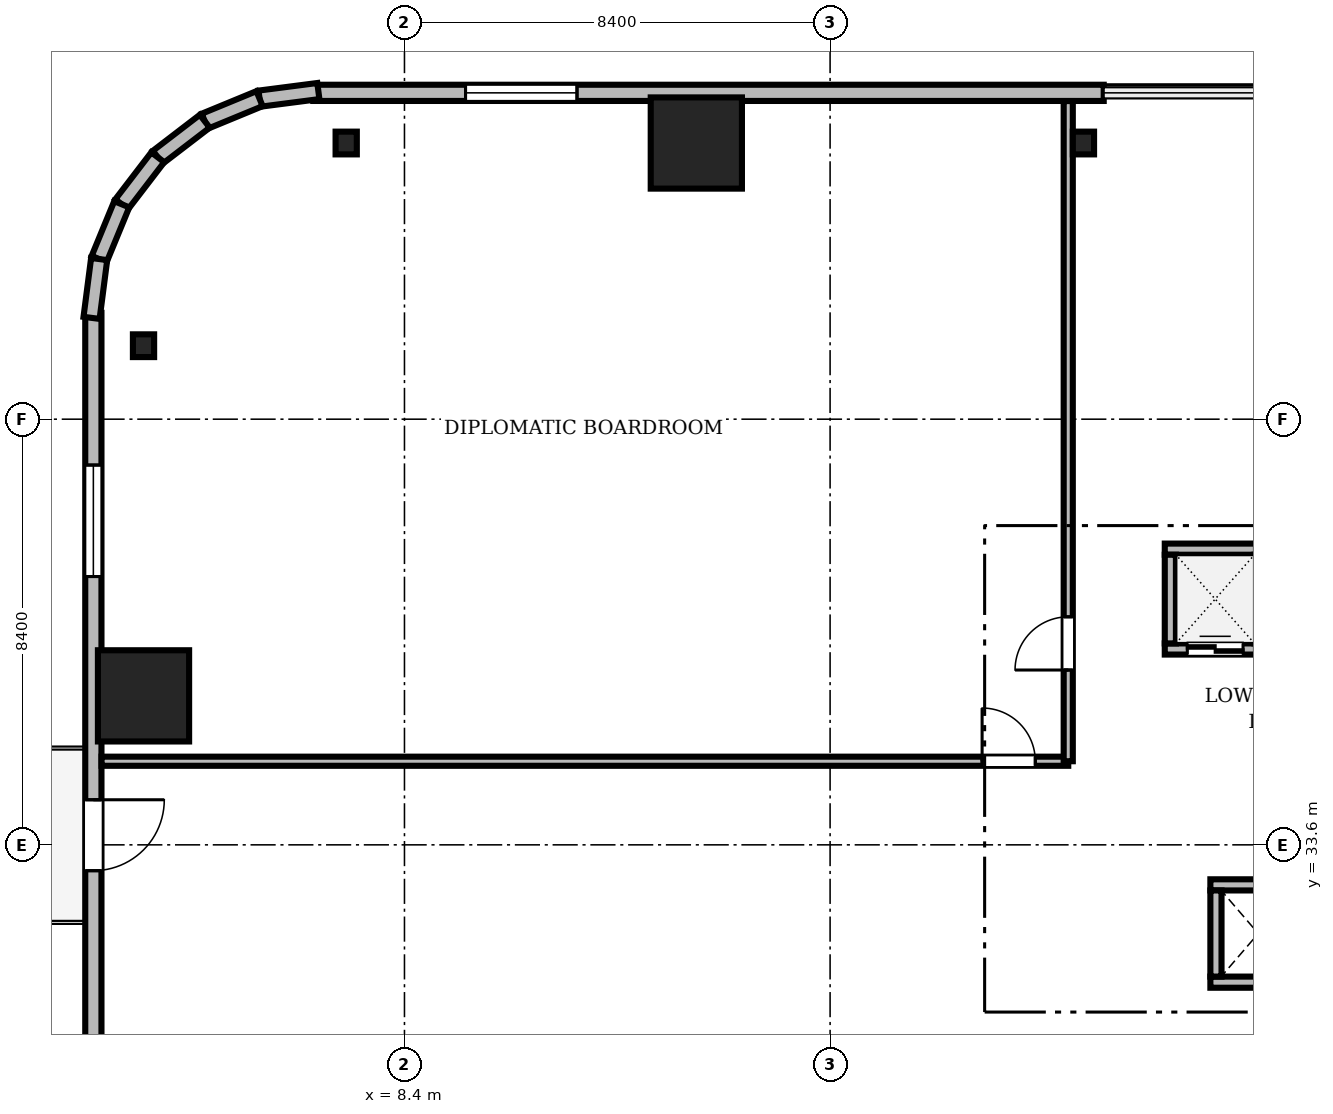
"""IFC4 building model, lengths in metres.
Left out: names, types, materials, properties, quantities, classifications, styles, units other than length and angle.
Written with IfcOpenShell. Run it as: python <this file> out.ifc"""

import sys

from ifc_helpers import new_model, si_unit, direction, frame, frame_2d, origin, origin_2d, place, context, subcontext, project, spatial, rectangle, i_section, extrude, source, transform, mapped, element, fill, save


model = new_model("IFC4")
c1 = context("Model", 3, precision=1e-05, world=origin(), true_north=direction((0.0, 1.0)))
c2 = subcontext(c1, "Body", "Model", "MODEL_VIEW")
j1 = project(units=[si_unit("LENGTHUNIT", "METRE"), si_unit("PLANEANGLEUNIT", "RADIAN")], contexts=[c1])
p1 = place(None, origin())
s1 = spatial("IfcSite", under=j1, at=p1, CompositionType="ELEMENT")
p2 = place(p1, origin())
s2 = spatial("IfcBuilding", under=s1, at=p2, CompositionType="ELEMENT")
p3 = place(p2, frame((0.0, 0.0, 31.25)))
s3 = spatial("IfcBuildingStorey", under=s2, at=p3, CompositionType="ELEMENT", Elevation=31.25)
m1 = source(origin(), c2, "Body", "SweptSolid", [
    extrude(rectangle(XDim=1.8, YDim=1.8, at=origin_2d()), origin(), (0.0, 0.0, 1.0), 3.41),
])
for number, where, z_axis, x_axis in (
    (1, (14.16, 47.45, 0.0), (0.0, 0.0, 1.0), (1.0, 0.0, 0.0)),
    (2, (3.25, 36.54, 0.0), (0.0, 0.0, 1.0), (1.0, 0.0, 0.0)),
):
    element("IfcColumn", number, at=place(p3, frame(where, z_axis=z_axis, x_axis=x_axis)), inside=s3, PredefinedType="COLUMN", context=c2, shape_type="MappedRepresentation", body=[
        mapped(m1, transform((0.0, 0.0, 0.0), scale=1.0)),
    ])
m2 = source(origin(), c2, "Body", "SweptSolid", [
    extrude(i_section(OverallWidth=0.419, OverallDepth=0.449, WebThickness=0.031, FlangeThickness=0.048, FilletRadius=0.015, at=origin_2d()), origin(), (0.0, 0.0, 1.0), 3.41),
])
for number, where, z_axis, x_axis in (
    (3, (21.8, 47.45, 0.0), (0.0, 0.0, 1.0), (1.0, 0.0, 0.0)),
    (4, (7.25, 47.45, 0.0), (0.0, 0.0, 1.0), (1.0, 0.0, 0.0)),
    (5, (3.25, 43.45, 0.0), (0.0, 0.0, 1.0), (1.0, 0.0, 0.0)),
):
    element("IfcColumn", number, at=place(p3, frame(where, z_axis=z_axis, x_axis=x_axis)), inside=s3, PredefinedType="COLUMN", context=c2, shape_type="MappedRepresentation", body=[
        mapped(m2, transform((0.0, 0.0, 0.0), scale=1.0)),
    ])
m3 = source(origin(), c2, "Body", "SweptSolid", [
    extrude(rectangle(XDim=15.6, YDim=0.32, at=frame_2d((7.8, 0.0))), origin(), (0.0, 0.0, 1.0), 3.41),
])
p4 = place(p3, frame((22.2, 48.44, 0.0), z_axis=(0.0, 0.0, 1.0), x_axis=(-1.0, 0.0, 0.0)))
e6 = element("IfcWall", 6, at=p4, inside=s3, PredefinedType="SOLIDWALL", context=c2, shape_type="MappedRepresentation", body=[
    mapped(m3, transform((0.0, 0.0, 0.0), scale=1.0)),
])
m4 = source(origin(), c2, "Body", "SweptSolid", [
    extrude(rectangle(XDim=2.2, YDim=2.4, at=frame_2d((1.1, 1.2))), frame((0.0, 0.17, 0.0), z_axis=(0.0, -1.0, 0.0), x_axis=(1.0, 0.0, 0.0)), (0.0, 0.0, 1.0), 0.34),
])
p5 = place(p4, frame((10.395, 0.0, 0.72)))
e7 = element("IfcOpeningElement", 7, at=p5, cuts=e6, PredefinedType="OPENING", context=c2, shape_type="MappedRepresentation", body=[
    mapped(m4, transform((0.0, 0.0, 0.0), scale=1.0)),
])
m5 = source(origin(), c2, "Body", "SweptSolid", [
    extrude(rectangle(XDim=15.6, YDim=0.32, at=frame_2d((7.8, 0.0))), origin(), (0.0, 0.0, 1.0), 3.41),
])
p6 = place(p3, frame((2.26, 44.1, 0.0), z_axis=(0.0, 0.0, 1.0), x_axis=(0.0, -1.0, 0.0)))
e8 = element("IfcWall", 8, at=p6, inside=s3, PredefinedType="SOLIDWALL", context=c2, shape_type="MappedRepresentation", body=[
    mapped(m5, transform((0.0, 0.0, 0.0), scale=1.0)),
])
m6 = source(origin(), c2, "Body", "SweptSolid", [
    extrude(rectangle(XDim=1.4, YDim=2.3, at=frame_2d((0.7, 1.15))), frame((0.0, 0.17, 0.0), z_axis=(0.0, -1.0, 0.0), x_axis=(1.0, 0.0, 0.0)), (0.0, 0.0, 1.0), 0.34),
])
p7 = place(p6, frame((9.61, 0.0, 0.0)))
e9 = element("IfcOpeningElement", 9, at=p7, cuts=e8, PredefinedType="OPENING", context=c2, shape_type="MappedRepresentation", body=[
    mapped(m6, transform((0.0, 0.0, 0.0), scale=1.0)),
])
p8 = place(p6, frame((3.005, 0.0, 0.72)))
e10 = element("IfcOpeningElement", 10, at=p8, cuts=e8, PredefinedType="OPENING", context=c2, shape_type="MappedRepresentation", body=[
    mapped(m4, transform((0.0, 0.0, 0.0), scale=1.0)),
])
m7 = source(origin(), c2, "Body", "SweptSolid", [
    extrude(rectangle(XDim=1.17, YDim=0.32, at=frame_2d((0.585, 0.0))), origin(), (0.0, 0.0, 1.0), 3.41),
])
p9 = place(p3, frame((6.7, 48.476, 0.0), z_axis=(0.0, 0.0, 1.0), x_axis=(-0.991735963317, -0.128295670475, 0.0)))
e11 = element("IfcWall", 11, at=p9, inside=s3, PredefinedType="SOLIDWALL", context=c2, shape_type="MappedRepresentation", body=[
    mapped(m7, transform((0.0, 0.0, 0.0), scale=1.0)),
])
m8 = source(origin(), c2, "Body", "SweptSolid", [
    extrude(rectangle(XDim=1.169, YDim=0.32, at=frame_2d((0.584, 0.0))), origin(), (0.0, 0.0, 1.0), 3.41),
])
p10 = place(p3, frame((5.54, 48.325, 0.0), z_axis=(0.0, 0.0, 1.0), x_axis=(-0.924552646638, -0.381054331552, 0.0)))
e12 = element("IfcWall", 12, at=p10, inside=s3, PredefinedType="SOLIDWALL", context=c2, shape_type="MappedRepresentation", body=[
    mapped(m8, transform((0.0, 0.0, 0.0), scale=1.0)),
])
m9 = source(origin(), c2, "Body", "SweptSolid", [
    extrude(rectangle(XDim=1.169, YDim=0.32, at=frame_2d((0.584, 0.0))), origin(), (0.0, 0.0, 1.0), 3.41),
])
p11 = place(p3, frame((4.459, 47.88, 0.0), z_axis=(0.0, 0.0, 1.0), x_axis=(-0.793663520347, -0.608356981114, 0.0)))
e13 = element("IfcWall", 13, at=p11, inside=s3, PredefinedType="SOLIDWALL", context=c2, shape_type="MappedRepresentation", body=[
    mapped(m9, transform((0.0, 0.0, 0.0), scale=1.0)),
])
m10 = source(origin(), c2, "Body", "SweptSolid", [
    extrude(rectangle(XDim=1.169, YDim=0.32, at=frame_2d((0.584, 0.0))), origin(), (0.0, 0.0, 1.0), 3.41),
])
p12 = place(p3, frame((3.531, 47.169, 0.0), z_axis=(0.0, 0.0, 1.0), x_axis=(-0.608387696831, -0.793639975269, 0.0)))
e14 = element("IfcWall", 14, at=p12, inside=s3, PredefinedType="SOLIDWALL", context=c2, shape_type="MappedRepresentation", body=[
    mapped(m10, transform((0.0, 0.0, 0.0), scale=1.0)),
])
p13 = place(p3, frame((2.82, 46.241, 0.0), z_axis=(0.0, 0.0, 1.0), x_axis=(-0.381054331552, -0.924552646638, 0.0)))
e15 = element("IfcWall", 15, at=p13, inside=s3, PredefinedType="SOLIDWALL", context=c2, shape_type="MappedRepresentation", body=[
    mapped(m8, transform((0.0, 0.0, 0.0), scale=1.0)),
])
p14 = place(p3, frame((2.375, 45.16, 0.0), z_axis=(0.0, 0.0, 1.0), x_axis=(-0.128295670475, -0.991735963317, 0.0)))
e16 = element("IfcWall", 16, at=p14, inside=s3, PredefinedType="SOLIDWALL", context=c2, shape_type="MappedRepresentation", body=[
    mapped(m7, transform((0.0, 0.0, 0.0), scale=1.0)),
])
m11 = source(origin(), c2, "Body", "SweptSolid", [
    extrude(rectangle(XDim=1.99, YDim=0.22, at=frame_2d((0.995, 0.0))), origin(), (0.0, 0.0, 1.0), 3.41),
])
p15 = place(p3, frame((23.405, 37.465, 0.0), z_axis=(0.0, 0.0, 1.0), x_axis=(1.0, 0.0, 0.0)))
e17 = element("IfcWall", 17, at=p15, inside=s3, PredefinedType="SOLIDWALL", context=c2, shape_type="MappedRepresentation", body=[
    mapped(m11, transform((0.0, 0.0, 0.0), scale=1.0)),
])
m12 = source(origin(), c2, "Body", "SweptSolid", [
    extrude(rectangle(XDim=1.1, YDim=2.2, at=frame_2d((0.55, 1.1))), frame((0.0, 0.12, 0.0), z_axis=(0.0, -1.0, 0.0), x_axis=(1.0, 0.0, 0.0)), (0.0, 0.0, 1.0), 0.24),
])
p16 = place(p15, frame((0.445, 0.0, 0.0)))
e18 = element("IfcOpeningElement", 18, at=p16, cuts=e17, PredefinedType="OPENING", context=c2, shape_type="MappedRepresentation", body=[
    mapped(m12, transform((0.0, 0.0, 0.0), scale=1.0)),
])
p17 = place(p3, frame((23.405, 39.435, 0.0), z_axis=(0.0, 0.0, 1.0), x_axis=(1.0, 0.0, 0.0)))
e19 = element("IfcWall", 19, at=p17, inside=s3, PredefinedType="SOLIDWALL", context=c2, shape_type="MappedRepresentation", body=[
    mapped(m11, transform((0.0, 0.0, 0.0), scale=1.0)),
])
m13 = source(origin(), c2, "Body", "SweptSolid", [
    extrude(rectangle(XDim=1.75, YDim=0.22, at=frame_2d((0.875, 0.0))), origin(), (0.0, 0.0, 1.0), 3.41),
])
p18 = place(p3, frame((23.515, 37.575, 0.0), z_axis=(0.0, 0.0, 1.0), x_axis=(0.0, 1.0, 0.0)))
e20 = element("IfcWall", 20, at=p18, inside=s3, PredefinedType="SOLIDWALL", context=c2, shape_type="MappedRepresentation", body=[
    mapped(m13, transform((0.0, 0.0, 0.0), scale=1.0)),
])
m14 = source(origin(), c2, "Body", "SweptSolid", [
    extrude(rectangle(XDim=1.89, YDim=0.22, at=frame_2d((0.945, 0.0))), origin(), (0.0, 0.0, 1.0), 3.41),
])
for number, where, z_axis, x_axis in (
    (21, (24.305, 30.89, 0.0), (0.0, 0.0, 1.0), (1.0, 0.0, 0.0)),
    (22, (24.305, 32.81, 0.0), (0.0, 0.0, 1.0), (1.0, 0.0, 0.0)),
):
    element("IfcWall", number, at=place(p3, frame(where, z_axis=z_axis, x_axis=x_axis)), inside=s3, PredefinedType="SOLIDWALL", context=c2, shape_type="MappedRepresentation", body=[
        mapped(m14, transform((0.0, 0.0, 0.0), scale=1.0)),
    ])
m15 = source(origin(), c2, "Body", "SweptSolid", [
    extrude(rectangle(XDim=1.7, YDim=0.22, at=frame_2d((0.85, 0.0))), origin(), (0.0, 0.0, 1.0), 3.41),
])
p19 = place(p3, frame((24.415, 31.0, 0.0), z_axis=(0.0, 0.0, 1.0), x_axis=(0.0, 1.0, 0.0)))
e23 = element("IfcWall", 23, at=p19, inside=s3, PredefinedType="SOLIDWALL", context=c2, shape_type="MappedRepresentation", body=[
    mapped(m15, transform((0.0, 0.0, 0.0), scale=1.0)),
])
m16 = source(origin(), c2, "Body", "SweptSolid", [
    extrude(rectangle(XDim=19.078, YDim=0.18, at=frame_2d((9.539, 0.0))), origin(), (0.0, 0.0, 1.0), 2.652),
])
p20 = place(p3, frame((2.422, 35.25, 0.0), z_axis=(0.0, 0.0, 1.0), x_axis=(1.0, 0.0, 0.0)))
e24 = element("IfcWall", 24, at=p20, inside=s3, PredefinedType="PARTITIONING", context=c2, shape_type="MappedRepresentation", body=[
    mapped(m16, transform((0.0, 0.0, 0.0), scale=1.0)),
])
m17 = source(origin(), c2, "Body", "SweptSolid", [
    extrude(rectangle(XDim=1.05, YDim=2.2, at=frame_2d((0.525, 1.1))), frame((0.0, 0.1, 0.0), z_axis=(0.0, -1.0, 0.0), x_axis=(1.0, 0.0, 0.0)), (0.0, 0.0, 1.0), 0.2),
])
p21 = place(p20, frame((17.378, 0.0, 0.0)))
e25 = element("IfcOpeningElement", 25, at=p21, cuts=e24, PredefinedType="OPENING", context=c2, shape_type="MappedRepresentation", body=[
    mapped(m17, transform((0.0, 0.0, 0.0), scale=1.0)),
])
m18 = source(origin(), c2, "Body", "SweptSolid", [
    extrude(rectangle(XDim=13.028, YDim=0.18, at=frame_2d((6.514, 0.0))), origin(), (0.0, 0.0, 1.0), 2.652),
])
p22 = place(p3, frame((21.5, 35.25, 0.0), z_axis=(0.0, 0.0, 1.0), x_axis=(0.0, 1.0, 0.0)))
e26 = element("IfcWall", 26, at=p22, inside=s3, PredefinedType="PARTITIONING", context=c2, shape_type="MappedRepresentation", body=[
    mapped(m18, transform((0.0, 0.0, 0.0), scale=1.0)),
])
p23 = place(p22, frame((1.8, 0.0, 0.0)))
e27 = element("IfcOpeningElement", 27, at=p23, cuts=e26, PredefinedType="OPENING", context=c2, shape_type="MappedRepresentation", body=[
    mapped(m17, transform((0.0, 0.0, 0.0), scale=1.0)),
])
m19 = source(origin(), c2, "Body", "SweptSolid", [
    extrude(rectangle(XDim=2.2, YDim=2.4, at=frame_2d((1.1, 1.2))), frame((0.0, 0.03, 0.0), z_axis=(0.0, -1.0, 0.0), x_axis=(1.0, 0.0, 0.0)), (0.0, 0.0, 1.0), 0.06),
])
p24 = place(p5, origin())
e28 = element("IfcWindow", 28, at=p24, inside=s3, PartitioningType="SINGLE_PANEL", PredefinedType="WINDOW", context=c2, shape_type="MappedRepresentation", body=[
    mapped(m19, transform((0.0, 0.0, 0.0), scale=1.0)),
])
fill(e7, e28)
m20 = source(origin(), c2, "Body", "SweptSolid", [
    extrude(rectangle(XDim=1.4, YDim=2.3, at=frame_2d((0.7, 1.15))), frame((0.0, 0.025, 0.0), z_axis=(0.0, -1.0, 0.0), x_axis=(1.0, 0.0, 0.0)), (0.0, 0.0, 1.0), 0.05),
])
p25 = place(p7, frame((1.4, 0.0, 0.0), z_axis=(0.0, 0.0, 1.0), x_axis=(-1.0, 0.0, 0.0)))
e29 = element("IfcDoor", 29, at=p25, inside=s3, OperationType="DOUBLE_DOOR_SLIDING", PredefinedType="DOOR", context=c2, shape_type="MappedRepresentation", body=[
    mapped(m20, transform((0.0, 0.0, 0.0), scale=1.0)),
])
fill(e9, e29)
p26 = place(p8, origin())
e30 = element("IfcWindow", 30, at=p26, inside=s3, PartitioningType="SINGLE_PANEL", PredefinedType="WINDOW", context=c2, shape_type="MappedRepresentation", body=[
    mapped(m19, transform((0.0, 0.0, 0.0), scale=1.0)),
])
fill(e10, e30)
m21 = source(origin(), c2, "Body", "SweptSolid", [
    extrude(rectangle(XDim=1.1, YDim=2.2, at=frame_2d((0.55, 1.1))), frame((0.0, 0.025, 0.0), z_axis=(0.0, -1.0, 0.0), x_axis=(1.0, 0.0, 0.0)), (0.0, 0.0, 1.0), 0.05),
])
p27 = place(p16, origin())
e31 = element("IfcDoor", 31, at=p27, inside=s3, OperationType="DOUBLE_DOOR_SLIDING", PredefinedType="DOOR", context=c2, shape_type="MappedRepresentation", body=[
    mapped(m21, transform((0.0, 0.0, 0.0), scale=1.0)),
])
fill(e18, e31)
m22 = source(origin(), c2, "Body", "SweptSolid", [
    extrude(rectangle(XDim=1.05, YDim=2.2, at=frame_2d((0.525, 1.1))), frame((0.0, 0.025, 0.0), z_axis=(0.0, -1.0, 0.0), x_axis=(1.0, 0.0, 0.0)), (0.0, 0.0, 1.0), 0.05),
])
p28 = place(p21, origin())
e32 = element("IfcDoor", 32, at=p28, inside=s3, OperationType="SINGLE_SWING_LEFT", PredefinedType="DOOR", context=c2, shape_type="MappedRepresentation", body=[
    mapped(m22, transform((0.0, 0.0, 0.0), scale=1.0)),
])
fill(e25, e32)
p29 = place(p23, origin())
e33 = element("IfcDoor", 33, at=p29, inside=s3, OperationType="SINGLE_SWING_LEFT", PredefinedType="DOOR", context=c2, shape_type="MappedRepresentation", body=[
    mapped(m22, transform((0.0, 0.0, 0.0), scale=1.0)),
])
fill(e27, e33)
save(model, sys.argv[1])
